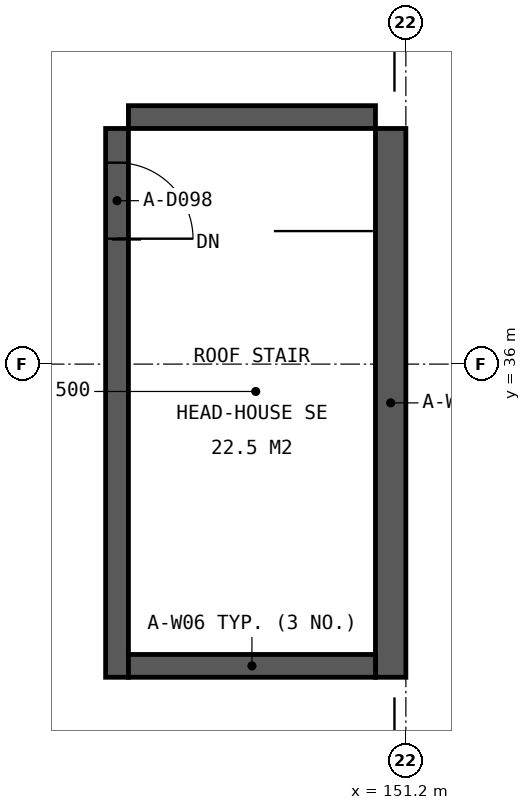
"""IFC4 building model, lengths in metres.
Left out: names, types, materials, properties, quantities, classifications, styles, units other than length and angle.
Written with IfcOpenShell. Run it as: python <this file> out.ifc"""

import sys

from ifc_helpers import new_model, si_unit, direction, frame, frame_2d, origin, place, context, subcontext, project, spatial, rectangle, extrude, element, fill, save


model = new_model("IFC4")
c1 = context("Model", 3, precision=1e-05, world=origin(), true_north=direction((0.0, 1.0)))
c2 = subcontext(c1, "Body", "Model", "MODEL_VIEW")
j1 = project(units=[si_unit("LENGTHUNIT", "METRE"), si_unit("PLANEANGLEUNIT", "RADIAN")], contexts=[c1])
p1 = place(None, origin())
s1 = spatial("IfcSite", under=j1, at=p1, CompositionType="ELEMENT")
p2 = place(p1, origin())
s2 = spatial("IfcBuilding", under=s1, at=p2, CompositionType="ELEMENT")
p3 = place(p2, frame((0.0, 0.0, 4.8)))
s3 = spatial("IfcBuildingStorey", under=s2, at=p3, CompositionType="ELEMENT", Elevation=4.8)
p4 = place(p3, frame((151.0, 39.1, 0.0), z_axis=(0.0, 0.0, 1.0), x_axis=(0.0, -1.0, 0.0)))
e1 = element("IfcWall", 1, at=p4, inside=s3, PredefinedType="SHEAR", context=c2, shape_type="SweptSolid", body=[
    extrude(rectangle(XDim=7.22, YDim=0.4, at=frame_2d((3.61, 0.0))), origin(), (0.0, 0.0, 1.0), 2.5),
])
p5 = place(p3, frame((147.4, 39.1, 0.0), z_axis=(0.0, 0.0, 1.0), x_axis=(0.0, -1.0, 0.0)))
e2 = element("IfcWall", 2, at=p5, inside=s3, PredefinedType="SHEAR", context=c2, shape_type="SweptSolid", body=[
    extrude(rectangle(XDim=7.22, YDim=0.3, at=frame_2d((3.61, 0.0))), origin(), (0.0, 0.0, 1.0), 2.5),
])
p6 = place(p5, frame((0.45, 0.0, 0.0)))
e3 = element("IfcOpeningElement", 3, at=p6, cuts=e2, PredefinedType="OPENING", context=c2, shape_type="SweptSolid", body=[
    extrude(rectangle(XDim=1.0, YDim=2.1, at=frame_2d((0.5, 1.05))), frame((0.0, 0.16, 0.0), z_axis=(0.0, -1.0, 0.0), x_axis=(1.0, 0.0, 0.0)), (0.0, 0.0, 1.0), 0.32),
])
for number, where, z_axis, x_axis in (
    (4, (150.8, 32.03, 0.0), (0.0, 0.0, 1.0), (-1.0, 0.0, 0.0)),
    (5, (150.8, 39.25, 0.0), (0.0, 0.0, 1.0), (-1.0, 0.0, 0.0)),
):
    element("IfcWall", number, at=place(p3, frame(where, z_axis=z_axis, x_axis=x_axis)), inside=s3, PredefinedType="SHEAR", context=c2, shape_type="SweptSolid", body=[
        extrude(rectangle(XDim=3.25, YDim=0.3, at=frame_2d((1.625, 0.0))), origin(), (0.0, 0.0, 1.0), 2.5),
    ])
p7 = place(p6, origin())
e6 = element("IfcDoor", 6, at=p7, inside=s3, OperationType="SINGLE_SWING_RIGHT", PredefinedType="DOOR", context=c2, shape_type="SweptSolid", body=[
    extrude(rectangle(XDim=1.0, YDim=2.1, at=frame_2d((0.5, 1.05))), frame((0.0, 0.025, 0.0), z_axis=(0.0, -1.0, 0.0), x_axis=(1.0, 0.0, 0.0)), (0.0, 0.0, 1.0), 0.05),
])
fill(e3, e6)
save(model, sys.argv[1])
